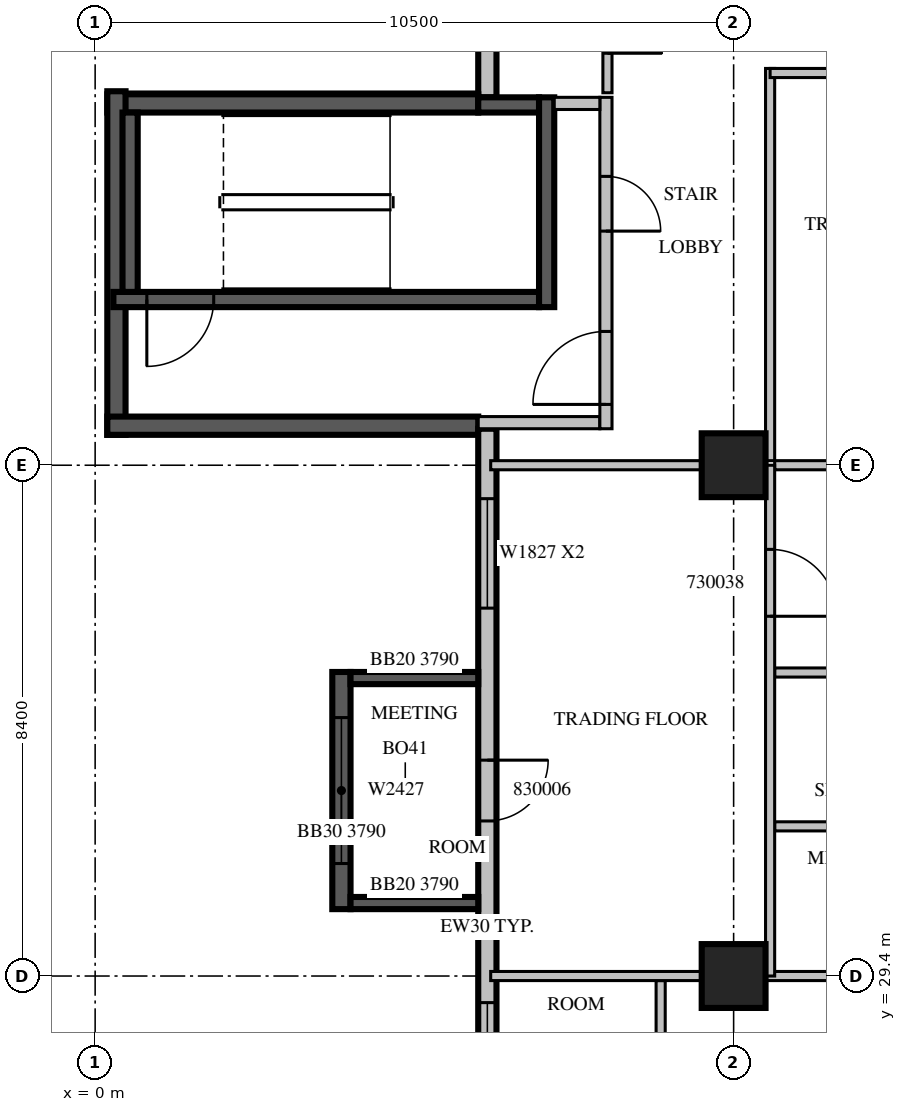
"""IFC4 building model, lengths in metres.
Left out: names, types, materials, properties, quantities, classifications, styles, units other than length and angle.
Written with IfcOpenShell. Run it as: python <this file> out.ifc"""

import sys

from ifc_helpers import new_model, si_unit, direction, frame, frame_2d, origin, origin_2d, place, context, subcontext, project, spatial, rectangle, extrude, source, transform, mapped, element, fill, save


model = new_model("IFC4")
c1 = context("Model", 3, precision=1e-05, world=origin(), true_north=direction((0.0, 1.0)))
c2 = subcontext(c1, "Body", "Model", "MODEL_VIEW")
j1 = project(units=[si_unit("LENGTHUNIT", "METRE"), si_unit("PLANEANGLEUNIT", "RADIAN")], contexts=[c1])
p1 = place(None, origin())
s1 = spatial("IfcSite", under=j1, at=p1, CompositionType="ELEMENT")
p2 = place(p1, origin())
s2 = spatial("IfcBuilding", under=s1, at=p2, CompositionType="ELEMENT")
p3 = place(p2, frame((0.0, 0.0, 137.1)))
s3 = spatial("IfcBuildingStorey", under=s2, at=p3, CompositionType="ELEMENT", Elevation=137.1)
m1 = source(origin(), c2, "Body", "SweptSolid", [
    extrude(rectangle(XDim=1.05, YDim=1.05, at=origin_2d()), origin(), (0.0, 0.0, 1.0), 4.2),
])
for number, where, z_axis, x_axis in (
    (1, (10.5, 29.4, 0.0), (0.0, 0.0, 1.0), (1.0, 0.0, 0.0)),
    (2, (10.5, 37.8, 0.0), (0.0, 0.0, 1.0), (1.0, 0.0, 0.0)),
):
    element("IfcColumn", number, at=place(p3, frame(where, z_axis=z_axis, x_axis=x_axis)), inside=s3, PredefinedType="COLUMN", context=c2, shape_type="MappedRepresentation", body=[
        mapped(m1, transform((0.0, 0.0, 0.0), scale=1.0)),
    ])
m2 = source(origin(), c2, "Body", "SweptSolid", [
    extrude(rectangle(XDim=9.91, YDim=0.3, at=frame_2d((4.955, 0.0))), origin(), (0.0, 0.0, 1.0), 3.8),
])
p4 = place(p3, frame((6.45, 53.76, 0.0), z_axis=(0.0, 0.0, 1.0), x_axis=(0.0, -1.0, 0.0)))
e3 = element("IfcWall", 3, at=p4, inside=s3, PredefinedType="STANDARD", context=c2, shape_type="MappedRepresentation", body=[
    mapped(m2, transform((0.0, 0.0, 0.0), scale=1.0)),
])
m3 = source(origin(), c2, "Body", "SweptSolid", [
    extrude(rectangle(XDim=2.4, YDim=2.7, at=frame_2d((1.2, 1.35))), frame((0.0, 0.16, 0.0), z_axis=(0.0, -1.0, 0.0), x_axis=(1.0, 0.0, 0.0)), (0.0, 0.0, 1.0), 0.32),
])
p5 = place(p4, frame((4.272, 0.0, 0.6)))
e4 = element("IfcOpeningElement", 4, at=p5, cuts=e3, PredefinedType="OPENING", context=c2, shape_type="MappedRepresentation", body=[
    mapped(m3, transform((0.0, 0.0, 0.0), scale=1.0)),
])
p6 = place(p4, frame((0.936, 0.0, 0.6)))
e5 = element("IfcOpeningElement", 5, at=p6, cuts=e3, PredefinedType="OPENING", context=c2, shape_type="MappedRepresentation", body=[
    mapped(m3, transform((0.0, 0.0, 0.0), scale=1.0)),
])
m4 = source(origin(), c2, "Body", "SweptSolid", [
    extrude(rectangle(XDim=6.1, YDim=0.3, at=frame_2d((3.05, 0.0))), origin(), (0.0, 0.0, 1.0), 3.8),
])
p7 = place(p3, frame((6.3, 43.75, 0.0), z_axis=(0.0, 0.0, 1.0), x_axis=(-1.0, 0.0, 0.0)))
e6 = element("IfcWall", 6, at=p7, inside=s3, PredefinedType="SOLIDWALL", context=c2, shape_type="MappedRepresentation", body=[
    mapped(m4, transform((0.0, 0.0, 0.0), scale=1.0)),
])
m5 = source(origin(), c2, "Body", "SweptSolid", [
    extrude(rectangle(XDim=5.65, YDim=0.3, at=frame_2d((2.825, 0.0))), origin(), (0.0, 0.0, 1.0), 3.8),
])
p8 = place(p3, frame((0.35, 43.95, 0.0), z_axis=(0.0, 0.0, 1.0), x_axis=(0.0, -1.0, 0.0)))
e7 = element("IfcWall", 7, at=p8, inside=s3, PredefinedType="SOLIDWALL", context=c2, shape_type="MappedRepresentation", body=[
    mapped(m5, transform((0.0, 0.0, 0.0), scale=1.0)),
])
p9 = place(p3, frame((0.2, 38.45, 0.0), z_axis=(0.0, 0.0, 1.0), x_axis=(1.0, 0.0, 0.0)))
e8 = element("IfcWall", 8, at=p9, inside=s3, PredefinedType="SOLIDWALL", context=c2, shape_type="MappedRepresentation", body=[
    mapped(m4, transform((0.0, 0.0, 0.0), scale=1.0)),
])
m6 = source(origin(), c2, "Body", "SweptSolid", [
    extrude(rectangle(XDim=16.4, YDim=0.3, at=frame_2d((8.2, 0.0))), origin(), (0.0, 0.0, 1.0), 3.8),
])
p10 = place(p3, frame((6.45, 38.4, 0.0), z_axis=(0.0, 0.0, 1.0), x_axis=(0.0, -1.0, 0.0)))
e9 = element("IfcWall", 9, at=p10, inside=s3, PredefinedType="STANDARD", context=c2, shape_type="MappedRepresentation", body=[
    mapped(m6, transform((0.0, 0.0, 0.0), scale=1.0)),
])
m7 = source(origin(), c2, "Body", "SweptSolid", [
    extrude(rectangle(XDim=1.8, YDim=2.7, at=frame_2d((0.9, 1.35))), frame((0.0, 0.16, 0.0), z_axis=(0.0, -1.0, 0.0), x_axis=(1.0, 0.0, 0.0)), (0.0, 0.0, 1.0), 0.32),
])
p11 = place(p10, frame((1.15, 0.0, 0.6)))
e10 = element("IfcOpeningElement", 10, at=p11, cuts=e9, PredefinedType="OPENING", context=c2, shape_type="MappedRepresentation", body=[
    mapped(m7, transform((0.0, 0.0, 0.0), scale=1.0)),
])
p12 = place(p10, frame((9.438, 0.0, 0.6)))
e11 = element("IfcOpeningElement", 11, at=p12, cuts=e9, PredefinedType="OPENING", context=c2, shape_type="MappedRepresentation", body=[
    mapped(m7, transform((0.0, 0.0, 0.0), scale=1.0)),
])
m8 = source(origin(), c2, "Body", "SweptSolid", [
    extrude(rectangle(XDim=3.0, YDim=2.7, at=frame_2d((1.5, 1.35))), frame((0.0, 0.16, 0.0), z_axis=(0.0, -1.0, 0.0), x_axis=(1.0, 0.0, 0.0)), (0.0, 0.0, 1.0), 0.32),
])
p13 = place(p10, frame((12.7, 0.0, 0.6)))
e12 = element("IfcOpeningElement", 12, at=p13, cuts=e9, PredefinedType="OPENING", context=c2, shape_type="MappedRepresentation", body=[
    mapped(m8, transform((0.0, 0.0, 0.0), scale=1.0)),
])
m9 = source(origin(), c2, "Body", "SweptSolid", [
    extrude(rectangle(XDim=1.0, YDim=2.1, at=frame_2d((0.5, 1.05))), frame((0.0, 0.16, 0.0), z_axis=(0.0, -1.0, 0.0), x_axis=(1.0, 0.0, 0.0)), (0.0, 0.0, 1.0), 0.32),
])
p14 = place(p10, frame((5.45, 0.0, 0.0)))
e13 = element("IfcOpeningElement", 13, at=p14, cuts=e9, PredefinedType="OPENING", context=c2, shape_type="MappedRepresentation", body=[
    mapped(m9, transform((0.0, 0.0, 0.0), scale=1.0)),
])
m10 = source(origin(), c2, "Body", "SweptSolid", [
    extrude(rectangle(XDim=3.9, YDim=0.3, at=frame_2d((1.95, 0.0))), origin(), (0.0, 0.0, 1.0), 3.79),
])
p15 = place(p3, frame((4.05, 34.4, 0.0), z_axis=(0.0, 0.0, 1.0), x_axis=(0.0, -1.0, 0.0)))
e14 = element("IfcWall", 14, at=p15, inside=s3, PredefinedType="SOLIDWALL", context=c2, shape_type="MappedRepresentation", body=[
    mapped(m10, transform((0.0, 0.0, 0.0), scale=1.0)),
])
p16 = place(p15, frame((0.75, 0.0, 0.6)))
e15 = element("IfcOpeningElement", 15, at=p16, cuts=e14, PredefinedType="OPENING", context=c2, shape_type="MappedRepresentation", body=[
    mapped(m3, transform((0.0, 0.0, 0.0), scale=1.0)),
])
m11 = source(origin(), c2, "Body", "SweptSolid", [
    extrude(rectangle(XDim=2.1, YDim=0.2, at=frame_2d((1.05, 0.0))), origin(), (0.0, 0.0, 1.0), 3.79),
])
for number, where, z_axis, x_axis in (
    (16, (6.3, 34.3, 0.0), (0.0, 0.0, 1.0), (-1.0, 0.0, 0.0)),
    (17, (6.3, 30.6, 0.0), (0.0, 0.0, 1.0), (-1.0, 0.0, 0.0)),
):
    element("IfcWall", number, at=place(p3, frame(where, z_axis=z_axis, x_axis=x_axis)), inside=s3, PredefinedType="SOLIDWALL", context=c2, shape_type="MappedRepresentation", body=[
        mapped(m11, transform((0.0, 0.0, 0.0), scale=1.0)),
    ])
m12 = source(origin(), c2, "Body", "SweptSolid", [
    extrude(rectangle(XDim=7.0, YDim=0.25, at=frame_2d((3.5, 0.0))), origin(), (0.0, 0.0, 1.0), 3.8),
])
p17 = place(p3, frame((0.3, 40.525, 0.0), z_axis=(0.0, 0.0, 1.0), x_axis=(1.0, 0.0, 0.0)))
e18 = element("IfcWall", 18, at=p17, inside=s3, PredefinedType="SOLIDWALL", context=c2, shape_type="MappedRepresentation", body=[
    mapped(m12, transform((0.0, 0.0, 0.0), scale=1.0)),
])
m13 = source(origin(), c2, "Body", "SweptSolid", [
    extrude(rectangle(XDim=1.1, YDim=2.1, at=frame_2d((0.55, 1.05))), frame((0.0, 0.135, 0.0), z_axis=(0.0, -1.0, 0.0), x_axis=(1.0, 0.0, 0.0)), (0.0, 0.0, 1.0), 0.27),
])
p18 = place(p17, frame((0.55, 0.0, 0.0)))
e19 = element("IfcOpeningElement", 19, at=p18, cuts=e18, PredefinedType="OPENING", context=c2, shape_type="MappedRepresentation", body=[
    mapped(m13, transform((0.0, 0.0, 0.0), scale=1.0)),
])
m14 = source(origin(), c2, "Body", "SweptSolid", [
    extrude(rectangle(XDim=1.0, YDim=0.25, at=frame_2d((0.5, 0.0))), origin(), (0.0, 0.0, 1.0), 3.8),
])
p19 = place(p3, frame((6.3, 43.725, 0.0), z_axis=(0.0, 0.0, 1.0), x_axis=(1.0, 0.0, 0.0)))
e20 = element("IfcWall", 20, at=p19, inside=s3, PredefinedType="SOLIDWALL", context=c2, shape_type="MappedRepresentation", body=[
    mapped(m14, transform((0.0, 0.0, 0.0), scale=1.0)),
])
m15 = source(origin(), c2, "Body", "SweptSolid", [
    extrude(rectangle(XDim=3.45, YDim=0.25, at=frame_2d((1.725, 0.0))), origin(), (0.0, 0.0, 1.0), 3.8),
])
p20 = place(p3, frame((7.425, 40.4, 0.0), z_axis=(0.0, 0.0, 1.0), x_axis=(0.0, 1.0, 0.0)))
e21 = element("IfcWall", 21, at=p20, inside=s3, PredefinedType="SOLIDWALL", context=c2, shape_type="MappedRepresentation", body=[
    mapped(m15, transform((0.0, 0.0, 0.0), scale=1.0)),
])
m16 = source(origin(), c2, "Body", "SweptSolid", [
    extrude(rectangle(XDim=2.95, YDim=0.25, at=frame_2d((1.475, 0.0))), origin(), (0.0, 0.0, 1.0), 3.8),
])
p21 = place(p3, frame((0.575, 40.65, 0.0), z_axis=(0.0, 0.0, 1.0), x_axis=(0.0, 1.0, 0.0)))
e22 = element("IfcWall", 22, at=p21, inside=s3, PredefinedType="SOLIDWALL", context=c2, shape_type="MappedRepresentation", body=[
    mapped(m16, transform((0.0, 0.0, 0.0), scale=1.0)),
])
m17 = source(origin(), c2, "Body", "SweptSolid", [
    extrude(rectangle(XDim=2.0, YDim=0.2, at=frame_2d((1.0, 0.0))), origin(), (0.0, 0.0, 1.0), 3.8),
])
p22 = place(p3, frame((6.3, 38.5, 0.0), z_axis=(0.0, 0.0, 1.0), x_axis=(1.0, 0.0, 0.0)))
e23 = element("IfcWall", 23, at=p22, inside=s3, PredefinedType="PARTITIONING", context=c2, shape_type="MappedRepresentation", body=[
    mapped(m17, transform((0.0, 0.0, 0.0), scale=1.0)),
])
m18 = source(origin(), c2, "Body", "SweptSolid", [
    extrude(rectangle(XDim=5.45, YDim=0.2, at=frame_2d((2.725, 0.0))), origin(), (0.0, 0.0, 1.0), 3.8),
])
p23 = place(p3, frame((8.4, 38.4, 0.0), z_axis=(0.0, 0.0, 1.0), x_axis=(0.0, 1.0, 0.0)))
e24 = element("IfcWall", 24, at=p23, inside=s3, PredefinedType="PARTITIONING", context=c2, shape_type="MappedRepresentation", body=[
    mapped(m18, transform((0.0, 0.0, 0.0), scale=1.0)),
])
m19 = source(origin(), c2, "Body", "SweptSolid", [
    extrude(rectangle(XDim=1.2, YDim=2.1, at=frame_2d((0.6, 1.05))), frame((0.0, 0.11, 0.0), z_axis=(0.0, -1.0, 0.0), x_axis=(1.0, 0.0, 0.0)), (0.0, 0.0, 1.0), 0.22),
])
p24 = place(p23, frame((0.4, 0.0, 0.0)))
e25 = element("IfcOpeningElement", 25, at=p24, cuts=e24, PredefinedType="OPENING", context=c2, shape_type="MappedRepresentation", body=[
    mapped(m19, transform((0.0, 0.0, 0.0), scale=1.0)),
])
m20 = source(origin(), c2, "Body", "SweptSolid", [
    extrude(rectangle(XDim=0.9, YDim=2.1, at=frame_2d((0.45, 1.05))), frame((0.0, 0.11, 0.0), z_axis=(0.0, -1.0, 0.0), x_axis=(1.0, 0.0, 0.0)), (0.0, 0.0, 1.0), 0.22),
])
p25 = place(p23, frame((3.25, 0.0, 0.0)))
e26 = element("IfcOpeningElement", 26, at=p25, cuts=e24, PredefinedType="OPENING", context=c2, shape_type="MappedRepresentation", body=[
    mapped(m20, transform((0.0, 0.0, 0.0), scale=1.0)),
])
m21 = source(origin(), c2, "Body", "SweptSolid", [
    extrude(rectangle(XDim=0.75, YDim=0.2, at=frame_2d((0.375, 0.0))), origin(), (0.0, 0.0, 1.0), 3.8),
])
p26 = place(p3, frame((7.55, 43.75, 0.0), z_axis=(0.0, 0.0, 1.0), x_axis=(1.0, 0.0, 0.0)))
e27 = element("IfcWall", 27, at=p26, inside=s3, PredefinedType="PARTITIONING", context=c2, shape_type="MappedRepresentation", body=[
    mapped(m21, transform((0.0, 0.0, 0.0), scale=1.0)),
])
m22 = source(origin(), c2, "Body", "SweptSolid", [
    extrude(rectangle(XDim=3.05, YDim=0.15, at=frame_2d((1.525, 0.0))), origin(), (0.0, 0.0, 1.0), 3.8),
])
p27 = place(p3, frame((9.3, 26.275, 0.0), z_axis=(0.0, 0.0, 1.0), x_axis=(0.0, 1.0, 0.0)))
e28 = element("IfcWall", 28, at=p27, inside=s3, PredefinedType="PARTITIONING", context=c2, shape_type="MappedRepresentation", body=[
    mapped(m22, transform((0.0, 0.0, 0.0), scale=1.0)),
])
m23 = source(origin(), c2, "Body", "SweptSolid", [
    extrude(rectangle(XDim=3.471, YDim=0.15, at=frame_2d((1.736, 0.0))), origin(), (0.0, 0.0, 1.0), 3.8),
])
p28 = place(p3, frame((9.976, 29.4, 0.0), z_axis=(0.0, 0.0, 1.0), x_axis=(-1.0, 0.0, 0.0)))
e29 = element("IfcWall", 29, at=p28, inside=s3, PredefinedType="PARTITIONING", context=c2, shape_type="MappedRepresentation", body=[
    mapped(m23, transform((0.0, 0.0, 0.0), scale=1.0)),
])
m24 = source(origin(), c2, "Body", "SweptSolid", [
    extrude(rectangle(XDim=3.676, YDim=0.15, at=frame_2d((1.838, 0.0))), origin(), (0.0, 0.0, 1.0), 3.8),
])
p29 = place(p3, frame((14.7, 29.4, 0.0), z_axis=(0.0, 0.0, 1.0), x_axis=(-1.0, 0.0, 0.0)))
e30 = element("IfcWall", 30, at=p29, inside=s3, PredefinedType="PARTITIONING", context=c2, shape_type="MappedRepresentation", body=[
    mapped(m24, transform((0.0, 0.0, 0.0), scale=1.0)),
])
m25 = source(origin(), c2, "Body", "SweptSolid", [
    extrude(rectangle(XDim=6.45, YDim=0.15, at=frame_2d((3.225, 0.0))), origin(), (0.0, 0.0, 1.0), 3.8),
])
p30 = place(p3, frame((11.1, 44.325, 0.0), z_axis=(0.0, 0.0, 1.0), x_axis=(0.0, -1.0, 0.0)))
e31 = element("IfcWall", 31, at=p30, inside=s3, PredefinedType="PARTITIONING", context=c2, shape_type="MappedRepresentation", body=[
    mapped(m25, transform((0.0, 0.0, 0.0), scale=1.0)),
])
m26 = source(origin(), c2, "Body", "SweptSolid", [
    extrude(rectangle(XDim=3.675, YDim=0.15, at=frame_2d((1.837, 0.0))), origin(), (0.0, 0.0, 1.0), 3.8),
])
p31 = place(p3, frame((14.775, 44.25, 0.0), z_axis=(0.0, 0.0, 1.0), x_axis=(-1.0, 0.0, 0.0)))
e32 = element("IfcWall", 32, at=p31, inside=s3, PredefinedType="PARTITIONING", context=c2, shape_type="MappedRepresentation", body=[
    mapped(m26, transform((0.0, 0.0, 0.0), scale=1.0)),
])
m27 = source(origin(), c2, "Body", "SweptSolid", [
    extrude(rectangle(XDim=2.2, YDim=0.15, at=frame_2d((1.1, 0.0))), origin(), (0.0, 0.0, 1.0), 3.8),
])
p32 = place(p3, frame((8.425, 43.925, 0.0), z_axis=(0.0, 0.0, 1.0), x_axis=(0.0, 1.0, 0.0)))
e33 = element("IfcWall", 33, at=p32, inside=s3, PredefinedType="PARTITIONING", context=c2, shape_type="MappedRepresentation", body=[
    mapped(m27, transform((0.0, 0.0, 0.0), scale=1.0)),
])
m28 = source(origin(), c2, "Body", "SweptSolid", [
    extrude(rectangle(XDim=0.9, YDim=2.1, at=frame_2d((0.45, 1.05))), frame((0.0, 0.085, 0.0), z_axis=(0.0, -1.0, 0.0), x_axis=(1.0, 0.0, 0.0)), (0.0, 0.0, 1.0), 0.17),
])
p33 = place(p32, frame((0.65, 0.0, 0.0)))
e34 = element("IfcOpeningElement", 34, at=p33, cuts=e33, PredefinedType="OPENING", context=c2, shape_type="MappedRepresentation", body=[
    mapped(m28, transform((0.0, 0.0, 0.0), scale=1.0)),
])
m29 = source(origin(), c2, "Body", "SweptSolid", [
    extrude(rectangle(XDim=3.525, YDim=0.15, at=frame_2d((1.762, 0.0))), origin(), (0.0, 0.0, 1.0), 3.8),
])
for number, where, z_axis, x_axis in (
    (35, (14.7, 31.861, 0.0), (0.0, 0.0, 1.0), (-1.0, 0.0, 0.0)),
    (36, (14.7, 34.391, 0.0), (0.0, 0.0, 1.0), (-1.0, 0.0, 0.0)),
):
    element("IfcWall", number, at=place(p3, frame(where, z_axis=z_axis, x_axis=x_axis)), inside=s3, PredefinedType="PARTITIONING", context=c2, shape_type="MappedRepresentation", body=[
        mapped(m29, transform((0.0, 0.0, 0.0), scale=1.0)),
    ])
p34 = place(p3, frame((9.976, 37.8, 0.0), z_axis=(0.0, 0.0, 1.0), x_axis=(-1.0, 0.0, 0.0)))
e37 = element("IfcWall", 37, at=p34, inside=s3, PredefinedType="PARTITIONING", context=c2, shape_type="MappedRepresentation", body=[
    mapped(m23, transform((0.0, 0.0, 0.0), scale=1.0)),
])
p35 = place(p3, frame((14.7, 37.8, 0.0), z_axis=(0.0, 0.0, 1.0), x_axis=(-1.0, 0.0, 0.0)))
e38 = element("IfcWall", 38, at=p35, inside=s3, PredefinedType="PARTITIONING", context=c2, shape_type="MappedRepresentation", body=[
    mapped(m29, transform((0.0, 0.0, 0.0), scale=1.0)),
])
m30 = source(origin(), c2, "Body", "SweptSolid", [
    extrude(rectangle(XDim=8.4, YDim=0.15, at=frame_2d((4.2, 0.0))), origin(), (0.0, 0.0, 1.0), 3.8),
])
p36 = place(p3, frame((11.1, 29.4, 0.0), z_axis=(0.0, 0.0, 1.0), x_axis=(0.0, 1.0, 0.0)))
e39 = element("IfcWall", 39, at=p36, inside=s3, PredefinedType="PARTITIONING", context=c2, shape_type="MappedRepresentation", body=[
    mapped(m30, transform((0.0, 0.0, 0.0), scale=1.0)),
])
m31 = source(origin(), c2, "Body", "SweptSolid", [
    extrude(rectangle(XDim=1.1, YDim=2.1, at=frame_2d((0.55, 1.05))), frame((0.0, 0.085, 0.0), z_axis=(0.0, -1.0, 0.0), x_axis=(1.0, 0.0, 0.0)), (0.0, 0.0, 1.0), 0.17),
])
p37 = place(p36, frame((5.916, 0.0, 0.0)))
e40 = element("IfcOpeningElement", 40, at=p37, cuts=e39, PredefinedType="OPENING", context=c2, shape_type="MappedRepresentation", body=[
    mapped(m31, transform((0.0, 0.0, 0.0), scale=1.0)),
])
m32 = source(origin(), c2, "Body", "SweptSolid", [
    extrude(rectangle(XDim=1.8, YDim=2.7, at=frame_2d((0.9, 1.35))), frame((0.0, 0.03, 0.0), z_axis=(0.0, -1.0, 0.0), x_axis=(1.0, 0.0, 0.0)), (0.0, 0.0, 1.0), 0.06),
])
p38 = place(p11, origin())
e41 = element("IfcWindow", 41, at=p38, inside=s3, PartitioningType="SINGLE_PANEL", PredefinedType="WINDOW", context=c2, shape_type="MappedRepresentation", body=[
    mapped(m32, transform((0.0, 0.0, 0.0), scale=1.0)),
])
fill(e10, e41)
p39 = place(p12, origin())
e42 = element("IfcWindow", 42, at=p39, inside=s3, PartitioningType="SINGLE_PANEL", PredefinedType="WINDOW", context=c2, shape_type="MappedRepresentation", body=[
    mapped(m32, transform((0.0, 0.0, 0.0), scale=1.0)),
])
fill(e11, e42)
m33 = source(origin(), c2, "Body", "SweptSolid", [
    extrude(rectangle(XDim=2.4, YDim=2.7, at=frame_2d((1.2, 1.35))), frame((0.0, 0.03, 0.0), z_axis=(0.0, -1.0, 0.0), x_axis=(1.0, 0.0, 0.0)), (0.0, 0.0, 1.0), 0.06),
])
p40 = place(p16, origin())
e43 = element("IfcWindow", 43, at=p40, inside=s3, PartitioningType="SINGLE_PANEL", PredefinedType="WINDOW", context=c2, shape_type="MappedRepresentation", body=[
    mapped(m33, transform((0.0, 0.0, 0.0), scale=1.0)),
])
fill(e15, e43)
m34 = source(origin(), c2, "Body", "SweptSolid", [
    extrude(rectangle(XDim=1.1, YDim=2.1, at=frame_2d((0.55, 1.05))), frame((0.0, 0.025, 0.0), z_axis=(0.0, -1.0, 0.0), x_axis=(1.0, 0.0, 0.0)), (0.0, 0.0, 1.0), 0.05),
])
p41 = place(p18, origin())
e44 = element("IfcDoor", 44, at=p41, inside=s3, OperationType="SINGLE_SWING_RIGHT", PredefinedType="DOOR", context=c2, shape_type="MappedRepresentation", body=[
    mapped(m34, transform((0.0, 0.0, 0.0), scale=1.0)),
])
fill(e19, e44)
m35 = source(origin(), c2, "Body", "SweptSolid", [
    extrude(rectangle(XDim=1.2, YDim=2.1, at=frame_2d((0.6, 1.05))), frame((0.0, 0.025, 0.0), z_axis=(0.0, -1.0, 0.0), x_axis=(1.0, 0.0, 0.0)), (0.0, 0.0, 1.0), 0.05),
])
p42 = place(p24, origin())
e45 = element("IfcDoor", 45, at=p42, inside=s3, OperationType="SINGLE_SWING_LEFT", PredefinedType="DOOR", context=c2, shape_type="MappedRepresentation", body=[
    mapped(m35, transform((0.0, 0.0, 0.0), scale=1.0)),
])
fill(e25, e45)
m36 = source(origin(), c2, "Body", "SweptSolid", [
    extrude(rectangle(XDim=0.9, YDim=2.1, at=frame_2d((0.45, 1.05))), frame((0.0, 0.025, 0.0), z_axis=(0.0, -1.0, 0.0), x_axis=(1.0, 0.0, 0.0)), (0.0, 0.0, 1.0), 0.05),
])
p43 = place(p25, origin())
e46 = element("IfcDoor", 46, at=p43, inside=s3, OperationType="SINGLE_SWING_RIGHT", PredefinedType="DOOR", context=c2, shape_type="MappedRepresentation", body=[
    mapped(m36, transform((0.0, 0.0, 0.0), scale=1.0)),
])
fill(e26, e46)
p44 = place(p33, origin())
e47 = element("IfcDoor", 47, at=p44, inside=s3, OperationType="SINGLE_SWING_RIGHT", PredefinedType="DOOR", context=c2, shape_type="MappedRepresentation", body=[
    mapped(m36, transform((0.0, 0.0, 0.0), scale=1.0)),
])
fill(e34, e47)
p45 = place(p37, origin())
e48 = element("IfcDoor", 48, at=p45, inside=s3, OperationType="SINGLE_SWING_RIGHT", PredefinedType="DOOR", context=c2, shape_type="MappedRepresentation", body=[
    mapped(m34, transform((0.0, 0.0, 0.0), scale=1.0)),
])
fill(e40, e48)
m37 = source(origin(), c2, "Body", "SweptSolid", [
    extrude(rectangle(XDim=1.0, YDim=2.1, at=frame_2d((0.5, 1.05))), frame((0.0, 0.025, 0.0), z_axis=(0.0, -1.0, 0.0), x_axis=(1.0, 0.0, 0.0)), (0.0, 0.0, 1.0), 0.05),
])
p46 = place(p14, origin())
e49 = element("IfcDoor", 49, at=p46, inside=s3, OperationType="SINGLE_SWING_LEFT", PredefinedType="DOOR", context=c2, shape_type="MappedRepresentation", body=[
    mapped(m37, transform((0.0, 0.0, 0.0), scale=1.0)),
])
fill(e13, e49)
save(model, sys.argv[1])
